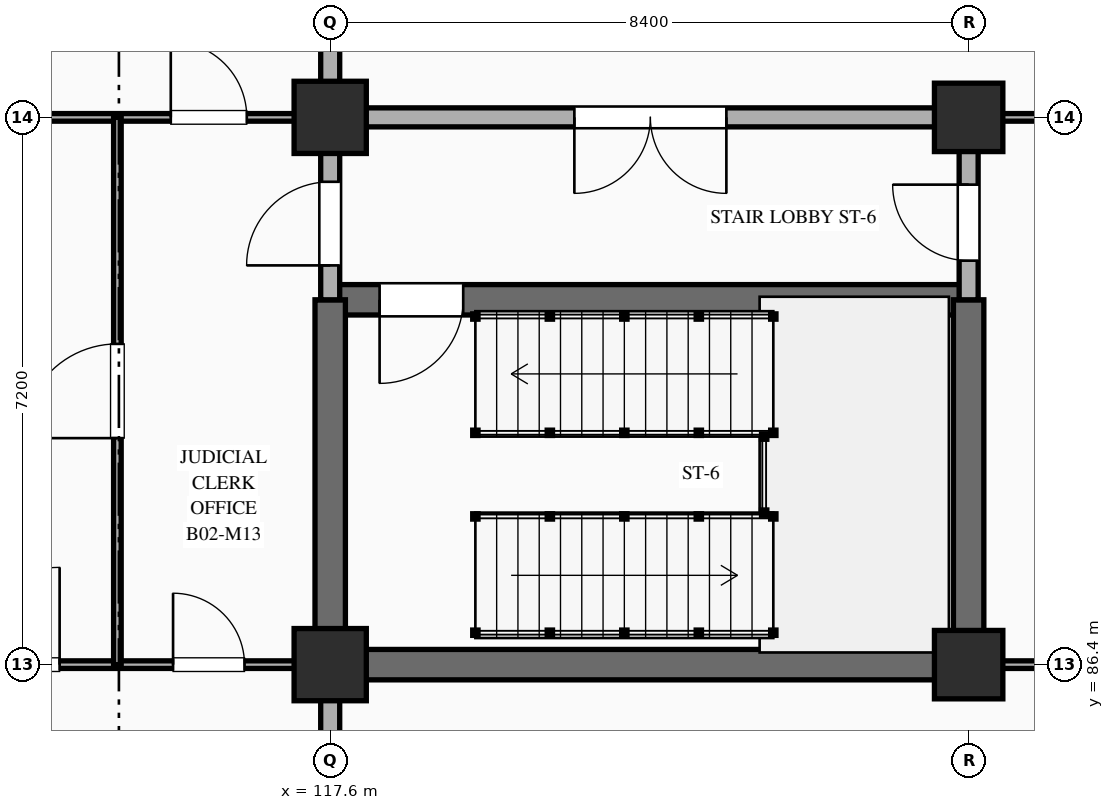
"""IFC4 building model, lengths in metres.
Left out: names, types, materials, properties, quantities, classifications, styles, units other than length and angle.
Written with IfcOpenShell. Run it as: python <this file> out.ifc"""

import sys

from ifc_helpers import new_model, si_unit, direction, frame, frame_2d, origin, origin_2d, place, context, subcontext, project, spatial, rectangle, extrude, element, fill, save


model = new_model("IFC4")
c1 = context("Model", 3, precision=1e-05, world=origin(), true_north=direction((0.0, 1.0)))
c2 = subcontext(c1, "Body", "Model", "MODEL_VIEW")
j1 = project(units=[si_unit("LENGTHUNIT", "METRE"), si_unit("PLANEANGLEUNIT", "RADIAN")], contexts=[c1])
p1 = place(None, origin())
s1 = spatial("IfcSite", under=j1, at=p1, CompositionType="ELEMENT")
p2 = place(p1, origin())
s2 = spatial("IfcBuilding", under=s1, at=p2, CompositionType="ELEMENT")
p3 = place(p2, frame((0.0, 0.0, -10.2)))
s3 = spatial("IfcBuildingStorey", under=s2, at=p3, CompositionType="ELEMENT", Elevation=-10.2)
for number, where, z_axis, x_axis in (
    (1, (117.6, 86.4, 0.0), (0.0, 0.0, 1.0), (1.0, 0.0, 0.0)),
    (2, (117.6, 93.6, 0.0), (0.0, 0.0, 1.0), (1.0, 0.0, 0.0)),
):
    element("IfcColumn", number, at=place(p3, frame(where, z_axis=z_axis, x_axis=x_axis)), inside=s3, PredefinedType="COLUMN", context=c2, shape_type="SweptSolid", body=[
        extrude(rectangle(XDim=0.95, YDim=0.95, at=origin_2d()), origin(), (0.0, 0.0, 1.0), 4.8),
    ])
for number, where, z_axis, x_axis in (
    (3, (126.0, 86.4, 0.0), (0.0, 0.0, 1.0), (1.0, 0.0, 0.0)),
    (4, (126.0, 93.6, 0.0), (0.0, 0.0, 1.0), (1.0, 0.0, 0.0)),
):
    element("IfcColumn", number, at=place(p3, frame(where, z_axis=z_axis, x_axis=x_axis)), inside=s3, PredefinedType="COLUMN", context=c2, shape_type="SweptSolid", body=[
        extrude(rectangle(XDim=0.9, YDim=0.9, at=origin_2d()), origin(), (0.0, 0.0, 1.0), 4.8),
    ])
p4 = place(p3, frame((109.2, 86.4, 0.0), z_axis=(0.0, 0.0, 1.0), x_axis=(1.0, 0.0, 0.0)))
e5 = element("IfcWall", 5, at=p4, inside=s3, PredefinedType="STANDARD", context=c2, shape_type="SweptSolid", body=[
    extrude(rectangle(XDim=8.4, YDim=0.1, at=frame_2d((4.2, 0.0))), origin(), (0.0, 0.0, 1.0), 3.63),
])
p5 = place(p4, frame((0.998, 0.0, 0.0)))
e6 = element("IfcOpeningElement", 6, at=p5, cuts=e5, PredefinedType="OPENING", context=c2, shape_type="SweptSolid", body=[
    extrude(rectangle(XDim=1.2, YDim=2.35, at=frame_2d((0.6, 1.175))), frame((0.0, 0.062, 0.0), z_axis=(0.0, -1.0, 0.0), x_axis=(1.0, 0.0, 0.0)), (0.0, 0.0, 1.0), 0.124),
])
p6 = place(p4, frame((3.56, 0.0, 0.0)))
e7 = element("IfcOpeningElement", 7, at=p6, cuts=e5, PredefinedType="OPENING", context=c2, shape_type="SweptSolid", body=[
    extrude(rectangle(XDim=1.28, YDim=2.35, at=frame_2d((0.64, 1.175))), frame((0.0, 0.062, 0.0), z_axis=(0.0, -1.0, 0.0), x_axis=(1.0, 0.0, 0.0)), (0.0, 0.0, 1.0), 0.124),
])
p7 = place(p4, frame((6.333, 0.0, 0.0)))
e8 = element("IfcOpeningElement", 8, at=p7, cuts=e5, PredefinedType="OPENING", context=c2, shape_type="SweptSolid", body=[
    extrude(rectangle(XDim=0.94, YDim=2.3, at=frame_2d((0.47, 1.15))), frame((0.0, 0.062, 0.0), z_axis=(0.0, -1.0, 0.0), x_axis=(1.0, 0.0, 0.0)), (0.0, 0.0, 1.0), 0.124),
])
p8 = place(p3, frame((117.6, 86.4, 0.0), z_axis=(0.0, 0.0, 1.0), x_axis=(1.0, 0.0, 0.0)))
e9 = element("IfcWall", 9, at=p8, inside=s3, PredefinedType="SHEAR", context=c2, shape_type="SweptSolid", body=[
    extrude(rectangle(XDim=8.4, YDim=0.4, at=frame_2d((4.2, 0.0))), origin(), (0.0, 0.0, 1.0), 4.48),
])
p9 = place(p3, frame((126.0, 86.4, 0.0), z_axis=(0.0, 0.0, 1.0), x_axis=(1.0, 0.0, 0.0)))
e10 = element("IfcWall", 10, at=p9, inside=s3, PredefinedType="STANDARD", context=c2, shape_type="SweptSolid", body=[
    extrude(rectangle(XDim=16.8, YDim=0.1, at=frame_2d((8.4, 0.0))), origin(), (0.0, 0.0, 1.0), 3.63),
])
p10 = place(p9, frame((3.722, 0.0, 0.0)))
e11 = element("IfcOpeningElement", 11, at=p10, cuts=e10, PredefinedType="OPENING", context=c2, shape_type="SweptSolid", body=[
    extrude(rectangle(XDim=0.98, YDim=2.35, at=frame_2d((0.49, 1.175))), frame((0.0, 0.062, 0.0), z_axis=(0.0, -1.0, 0.0), x_axis=(1.0, 0.0, 0.0)), (0.0, 0.0, 1.0), 0.124),
])
p11 = place(p9, frame((9.442, 0.0, 0.0)))
e12 = element("IfcOpeningElement", 12, at=p11, cuts=e10, PredefinedType="OPENING", context=c2, shape_type="SweptSolid", body=[
    extrude(rectangle(XDim=1.06, YDim=2.4, at=frame_2d((0.53, 1.2))), frame((0.0, 0.062, 0.0), z_axis=(0.0, -1.0, 0.0), x_axis=(1.0, 0.0, 0.0)), (0.0, 0.0, 1.0), 0.124),
])
p12 = place(p9, frame((11.75, 0.0, 0.0)))
e13 = element("IfcOpeningElement", 13, at=p12, cuts=e10, PredefinedType="OPENING", context=c2, shape_type="SweptSolid", body=[
    extrude(rectangle(XDim=1.7, YDim=2.45, at=frame_2d((0.85, 1.225))), frame((0.0, 0.062, 0.0), z_axis=(0.0, -1.0, 0.0), x_axis=(1.0, 0.0, 0.0)), (0.0, 0.0, 1.0), 0.124),
])
p13 = place(p9, frame((14.785, 0.0, 0.0)))
e14 = element("IfcOpeningElement", 14, at=p13, cuts=e10, PredefinedType="OPENING", context=c2, shape_type="SweptSolid", body=[
    extrude(rectangle(XDim=0.86, YDim=2.1, at=frame_2d((0.43, 1.05))), frame((0.0, 0.062, 0.0), z_axis=(0.0, -1.0, 0.0), x_axis=(1.0, 0.0, 0.0)), (0.0, 0.0, 1.0), 0.124),
])
p14 = place(p3, frame((117.6, 91.2, 0.0), z_axis=(0.0, 0.0, 1.0), x_axis=(1.0, 0.0, 0.0)))
e15 = element("IfcWall", 15, at=p14, inside=s3, PredefinedType="SHEAR", context=c2, shape_type="SweptSolid", body=[
    extrude(rectangle(XDim=8.4, YDim=0.4, at=frame_2d((4.2, 0.0))), origin(), (0.0, 0.0, 1.0), 4.48),
])
p15 = place(p14, frame((0.65, 0.0, 0.0)))
e16 = element("IfcOpeningElement", 16, at=p15, cuts=e15, PredefinedType="OPENING", context=c2, shape_type="SweptSolid", body=[
    extrude(rectangle(XDim=1.1, YDim=2.2, at=frame_2d((0.55, 1.1))), frame((0.0, 0.212, 0.0), z_axis=(0.0, -1.0, 0.0), x_axis=(1.0, 0.0, 0.0)), (0.0, 0.0, 1.0), 0.424),
])
p16 = place(p3, frame((109.2, 93.6, 0.0), z_axis=(0.0, 0.0, 1.0), x_axis=(1.0, 0.0, 0.0)))
e17 = element("IfcWall", 17, at=p16, inside=s3, PredefinedType="STANDARD", context=c2, shape_type="SweptSolid", body=[
    extrude(rectangle(XDim=8.4, YDim=0.1, at=frame_2d((4.2, 0.0))), origin(), (0.0, 0.0, 1.0), 3.63),
])
p17 = place(p16, frame((1.137, 0.0, 0.0)))
e18 = element("IfcOpeningElement", 18, at=p17, cuts=e17, PredefinedType="OPENING", context=c2, shape_type="SweptSolid", body=[
    extrude(rectangle(XDim=0.92, YDim=2.15, at=frame_2d((0.46, 1.075))), frame((0.0, 0.062, 0.0), z_axis=(0.0, -1.0, 0.0), x_axis=(1.0, 0.0, 0.0)), (0.0, 0.0, 1.0), 0.124),
])
p18 = place(p16, frame((3.72, 0.0, 0.0)))
e19 = element("IfcOpeningElement", 19, at=p18, cuts=e17, PredefinedType="OPENING", context=c2, shape_type="SweptSolid", body=[
    extrude(rectangle(XDim=0.96, YDim=2.2, at=frame_2d((0.48, 1.1))), frame((0.0, 0.062, 0.0), z_axis=(0.0, -1.0, 0.0), x_axis=(1.0, 0.0, 0.0)), (0.0, 0.0, 1.0), 0.124),
])
p19 = place(p16, frame((6.302, 0.0, 0.0)))
e20 = element("IfcOpeningElement", 20, at=p19, cuts=e17, PredefinedType="OPENING", context=c2, shape_type="SweptSolid", body=[
    extrude(rectangle(XDim=1.0, YDim=2.25, at=frame_2d((0.5, 1.125))), frame((0.0, 0.062, 0.0), z_axis=(0.0, -1.0, 0.0), x_axis=(1.0, 0.0, 0.0)), (0.0, 0.0, 1.0), 0.124),
])
p20 = place(p3, frame((117.6, 93.6, 0.0), z_axis=(0.0, 0.0, 1.0), x_axis=(1.0, 0.0, 0.0)))
e21 = element("IfcWall", 21, at=p20, inside=s3, PredefinedType="STANDARD", context=c2, shape_type="SweptSolid", body=[
    extrude(rectangle(XDim=8.4, YDim=0.25, at=frame_2d((4.2, 0.0))), origin(), (0.0, 0.0, 1.0), 3.63),
])
p21 = place(p20, frame((3.212, 0.0, 0.0)))
e22 = element("IfcOpeningElement", 22, at=p21, cuts=e21, PredefinedType="OPENING", context=c2, shape_type="SweptSolid", body=[
    extrude(rectangle(XDim=2.0, YDim=2.4, at=frame_2d((1.0, 1.2))), frame((0.0, 0.137, 0.0), z_axis=(0.0, -1.0, 0.0), x_axis=(1.0, 0.0, 0.0)), (0.0, 0.0, 1.0), 0.274),
])
p22 = place(p3, frame((126.0, 93.6, 0.0), z_axis=(0.0, 0.0, 1.0), x_axis=(1.0, 0.0, 0.0)))
e23 = element("IfcWall", 23, at=p22, inside=s3, PredefinedType="STANDARD", context=c2, shape_type="SweptSolid", body=[
    extrude(rectangle(XDim=16.8, YDim=0.1, at=frame_2d((8.4, 0.0))), origin(), (0.0, 0.0, 1.0), 3.63),
])
p23 = place(p22, frame((3.573, 0.0, 0.0)))
e24 = element("IfcOpeningElement", 24, at=p23, cuts=e23, PredefinedType="OPENING", context=c2, shape_type="SweptSolid", body=[
    extrude(rectangle(XDim=1.28, YDim=2.35, at=frame_2d((0.64, 1.175))), frame((0.0, 0.062, 0.0), z_axis=(0.0, -1.0, 0.0), x_axis=(1.0, 0.0, 0.0)), (0.0, 0.0, 1.0), 0.124),
])
p24 = place(p22, frame((9.502, 0.0, 0.0)))
e25 = element("IfcOpeningElement", 25, at=p24, cuts=e23, PredefinedType="OPENING", context=c2, shape_type="SweptSolid", body=[
    extrude(rectangle(XDim=0.94, YDim=2.3, at=frame_2d((0.47, 1.15))), frame((0.0, 0.062, 0.0), z_axis=(0.0, -1.0, 0.0), x_axis=(1.0, 0.0, 0.0)), (0.0, 0.0, 1.0), 0.124),
])
p25 = place(p22, frame((11.825, 0.0, 0.0)))
e26 = element("IfcOpeningElement", 26, at=p25, cuts=e23, PredefinedType="OPENING", context=c2, shape_type="SweptSolid", body=[
    extrude(rectangle(XDim=1.55, YDim=2.35, at=frame_2d((0.775, 1.175))), frame((0.0, 0.062, 0.0), z_axis=(0.0, -1.0, 0.0), x_axis=(1.0, 0.0, 0.0)), (0.0, 0.0, 1.0), 0.124),
])
p26 = place(p22, frame((14.705, 0.0, 0.0)))
e27 = element("IfcOpeningElement", 27, at=p26, cuts=e23, PredefinedType="OPENING", context=c2, shape_type="SweptSolid", body=[
    extrude(rectangle(XDim=1.02, YDim=2.4, at=frame_2d((0.51, 1.2))), frame((0.0, 0.062, 0.0), z_axis=(0.0, -1.0, 0.0), x_axis=(1.0, 0.0, 0.0)), (0.0, 0.0, 1.0), 0.124),
])
p27 = place(p3, frame((114.8, 86.4, 0.0), z_axis=(0.0, 0.0, 1.0), x_axis=(0.0, 1.0, 0.0)))
e28 = element("IfcWall", 28, at=p27, inside=s3, PredefinedType="STANDARD", context=c2, shape_type="SweptSolid", body=[
    extrude(rectangle(XDim=7.2, YDim=0.1, at=frame_2d((3.6, 0.0))), origin(), (0.0, 0.0, 1.0), 4.48),
])
p28 = place(p27, frame((2.98, 0.0, 0.0)))
e29 = element("IfcOpeningElement", 29, at=p28, cuts=e28, PredefinedType="OPENING", context=c2, shape_type="SweptSolid", body=[
    extrude(rectangle(XDim=1.24, YDim=2.3, at=frame_2d((0.62, 1.15))), frame((0.0, 0.062, 0.0), z_axis=(0.0, -1.0, 0.0), x_axis=(1.0, 0.0, 0.0)), (0.0, 0.0, 1.0), 0.124),
])
p29 = place(p3, frame((117.6, 43.2, 0.0), z_axis=(0.0, 0.0, 1.0), x_axis=(0.0, 1.0, 0.0)))
e30 = element("IfcWall", 30, at=p29, inside=s3, PredefinedType="STANDARD", context=c2, shape_type="SweptSolid", body=[
    extrude(rectangle(XDim=43.2, YDim=0.25, at=frame_2d((21.6, 0.0))), origin(), (0.0, 0.0, 1.0), 3.73),
])
p30 = place(p29, frame((41.327, 0.0, 0.0)))
e31 = element("IfcOpeningElement", 31, at=p30, cuts=e30, PredefinedType="OPENING", context=c2, shape_type="SweptSolid", body=[
    extrude(rectangle(XDim=0.95, YDim=2.15, at=frame_2d((0.475, 1.075))), frame((0.0, 0.137, 0.0), z_axis=(0.0, -1.0, 0.0), x_axis=(1.0, 0.0, 0.0)), (0.0, 0.0, 1.0), 0.274),
])
p31 = place(p3, frame((117.6, 86.4, 0.0), z_axis=(0.0, 0.0, 1.0), x_axis=(0.0, 1.0, 0.0)))
e32 = element("IfcWall", 32, at=p31, inside=s3, PredefinedType="SHEAR", context=c2, shape_type="SweptSolid", body=[
    extrude(rectangle(XDim=4.8, YDim=0.4, at=frame_2d((2.4, 0.0))), origin(), (0.0, 0.0, 1.0), 4.48),
])
p32 = place(p3, frame((117.6, 91.2, 0.0), z_axis=(0.0, 0.0, 1.0), x_axis=(0.0, 1.0, 0.0)))
e33 = element("IfcWall", 33, at=p32, inside=s3, PredefinedType="STANDARD", context=c2, shape_type="SweptSolid", body=[
    extrude(rectangle(XDim=23.96, YDim=0.25, at=frame_2d((11.98, 0.0))), origin(), (0.0, 0.0, 1.0), 3.73),
])
p33 = place(p32, frame((0.452, 0.0, 0.0)))
e34 = element("IfcOpeningElement", 34, at=p33, cuts=e33, PredefinedType="OPENING", context=c2, shape_type="SweptSolid", body=[
    extrude(rectangle(XDim=1.1, YDim=2.2, at=frame_2d((0.55, 1.1))), frame((0.0, 0.137, 0.0), z_axis=(0.0, -1.0, 0.0), x_axis=(1.0, 0.0, 0.0)), (0.0, 0.0, 1.0), 0.274),
])
p34 = place(p32, frame((10.498, 0.0, 0.0)))
e35 = element("IfcOpeningElement", 35, at=p34, cuts=e33, PredefinedType="OPENING", context=c2, shape_type="SweptSolid", body=[
    extrude(rectangle(XDim=1.0, YDim=2.2, at=frame_2d((0.5, 1.1))), frame((0.0, 0.137, 0.0), z_axis=(0.0, -1.0, 0.0), x_axis=(1.0, 0.0, 0.0)), (0.0, 0.0, 1.0), 0.274),
])
p35 = place(p32, frame((3.323, 0.0, 0.0)))
e36 = element("IfcOpeningElement", 36, at=p35, cuts=e33, PredefinedType="OPENING", context=c2, shape_type="SweptSolid", body=[
    extrude(rectangle(XDim=0.95, YDim=2.15, at=frame_2d((0.475, 1.075))), frame((0.0, 0.137, 0.0), z_axis=(0.0, -1.0, 0.0), x_axis=(1.0, 0.0, 0.0)), (0.0, 0.0, 1.0), 0.274),
])
p36 = place(p32, frame((17.698, 0.0, 0.0)))
e37 = element("IfcOpeningElement", 37, at=p36, cuts=e33, PredefinedType="OPENING", context=c2, shape_type="SweptSolid", body=[
    extrude(rectangle(XDim=1.0, YDim=2.2, at=frame_2d((0.5, 1.1))), frame((0.0, 0.137, 0.0), z_axis=(0.0, -1.0, 0.0), x_axis=(1.0, 0.0, 0.0)), (0.0, 0.0, 1.0), 0.274),
])
p37 = place(p3, frame((126.0, 86.4, 0.0), z_axis=(0.0, 0.0, 1.0), x_axis=(0.0, 1.0, 0.0)))
e38 = element("IfcWall", 38, at=p37, inside=s3, PredefinedType="SHEAR", context=c2, shape_type="SweptSolid", body=[
    extrude(rectangle(XDim=4.8, YDim=0.4, at=frame_2d((2.4, 0.0))), origin(), (0.0, 0.0, 1.0), 4.48),
])
p38 = place(p3, frame((126.0, 91.2, 0.0), z_axis=(0.0, 0.0, 1.0), x_axis=(0.0, 1.0, 0.0)))
e39 = element("IfcWall", 39, at=p38, inside=s3, PredefinedType="STANDARD", context=c2, shape_type="SweptSolid", body=[
    extrude(rectangle(XDim=2.4, YDim=0.25, at=frame_2d((1.2, 0.0))), origin(), (0.0, 0.0, 1.0), 3.73),
])
p39 = place(p38, frame((0.515, 0.0, 0.0)))
e40 = element("IfcOpeningElement", 40, at=p39, cuts=e39, PredefinedType="OPENING", context=c2, shape_type="SweptSolid", body=[
    extrude(rectangle(XDim=1.0, YDim=2.2, at=frame_2d((0.5, 1.1))), frame((0.0, 0.137, 0.0), z_axis=(0.0, -1.0, 0.0), x_axis=(1.0, 0.0, 0.0)), (0.0, 0.0, 1.0), 0.274),
])
p40 = place(p15, frame((1.1, 0.0, 0.0), z_axis=(0.0, 0.0, 1.0), x_axis=(-1.0, 0.0, 0.0)))
e41 = element("IfcDoor", 41, at=p40, inside=s3, OperationType="SINGLE_SWING_RIGHT", PredefinedType="DOOR", context=c2, shape_type="SweptSolid", body=[
    extrude(rectangle(XDim=1.1, YDim=2.2, at=frame_2d((0.55, 1.1))), frame((0.0, 0.025, 0.0), z_axis=(0.0, -1.0, 0.0), x_axis=(1.0, 0.0, 0.0)), (0.0, 0.0, 1.0), 0.05),
])
fill(e16, e41)
p41 = place(p21, frame((2.0, 0.0, 0.0), z_axis=(0.0, 0.0, 1.0), x_axis=(-1.0, 0.0, 0.0)))
e42 = element("IfcDoor", 42, at=p41, inside=s3, OperationType="DOUBLE_DOOR_SINGLE_SWING", PredefinedType="DOOR", context=c2, shape_type="SweptSolid", body=[
    extrude(rectangle(XDim=2.0, YDim=2.4, at=frame_2d((1.0, 1.2))), frame((0.0, 0.025, 0.0), z_axis=(0.0, -1.0, 0.0), x_axis=(1.0, 0.0, 0.0)), (0.0, 0.0, 1.0), 0.05),
])
fill(e22, e42)
p42 = place(p33, origin())
e43 = element("IfcDoor", 43, at=p42, inside=s3, OperationType="SINGLE_SWING_LEFT", PredefinedType="DOOR", context=c2, shape_type="SweptSolid", body=[
    extrude(rectangle(XDim=1.1, YDim=2.2, at=frame_2d((0.55, 1.1))), frame((0.0, 0.025, 0.0), z_axis=(0.0, -1.0, 0.0), x_axis=(1.0, 0.0, 0.0)), (0.0, 0.0, 1.0), 0.05),
])
fill(e34, e43)
p43 = place(p39, origin())
e44 = element("IfcDoor", 44, at=p43, inside=s3, OperationType="SINGLE_SWING_RIGHT", PredefinedType="DOOR", context=c2, shape_type="SweptSolid", body=[
    extrude(rectangle(XDim=1.0, YDim=2.2, at=frame_2d((0.5, 1.1))), frame((0.0, 0.025, 0.0), z_axis=(0.0, -1.0, 0.0), x_axis=(1.0, 0.0, 0.0)), (0.0, 0.0, 1.0), 0.05),
])
fill(e40, e44)
p44 = place(p19, origin())
e45 = element("IfcDoor", 45, at=p44, inside=s3, OperationType="SINGLE_SWING_LEFT", PredefinedType="DOOR", context=c2, shape_type="SweptSolid", body=[
    extrude(rectangle(XDim=1.0, YDim=2.25, at=frame_2d((0.5, 1.125))), frame((0.0, 0.025, 0.0), z_axis=(0.0, -1.0, 0.0), x_axis=(1.0, 0.0, 0.0)), (0.0, 0.0, 1.0), 0.05),
])
fill(e20, e45)
p45 = place(p28, origin())
e46 = element("IfcDoor", 46, at=p45, inside=s3, OperationType="SINGLE_SWING_LEFT", PredefinedType="DOOR", context=c2, shape_type="SweptSolid", body=[
    extrude(rectangle(XDim=1.24, YDim=2.3, at=frame_2d((0.62, 1.15))), frame((0.0, 0.025, 0.0), z_axis=(0.0, -1.0, 0.0), x_axis=(1.0, 0.0, 0.0)), (0.0, 0.0, 1.0), 0.05),
])
fill(e29, e46)
p46 = place(p6, origin())
e47 = element("IfcDoor", 47, at=p46, inside=s3, OperationType="SINGLE_SWING_RIGHT", PredefinedType="DOOR", context=c2, shape_type="SweptSolid", body=[
    extrude(rectangle(XDim=1.28, YDim=2.35, at=frame_2d((0.64, 1.175))), frame((0.0, 0.025, 0.0), z_axis=(0.0, -1.0, 0.0), x_axis=(1.0, 0.0, 0.0)), (0.0, 0.0, 1.0), 0.05),
])
fill(e7, e47)
p47 = place(p7, origin())
e48 = element("IfcDoor", 48, at=p47, inside=s3, OperationType="SINGLE_SWING_LEFT", PredefinedType="DOOR", context=c2, shape_type="SweptSolid", body=[
    extrude(rectangle(XDim=0.94, YDim=2.3, at=frame_2d((0.47, 1.15))), frame((0.0, 0.025, 0.0), z_axis=(0.0, -1.0, 0.0), x_axis=(1.0, 0.0, 0.0)), (0.0, 0.0, 1.0), 0.05),
])
fill(e8, e48)
save(model, sys.argv[1])
